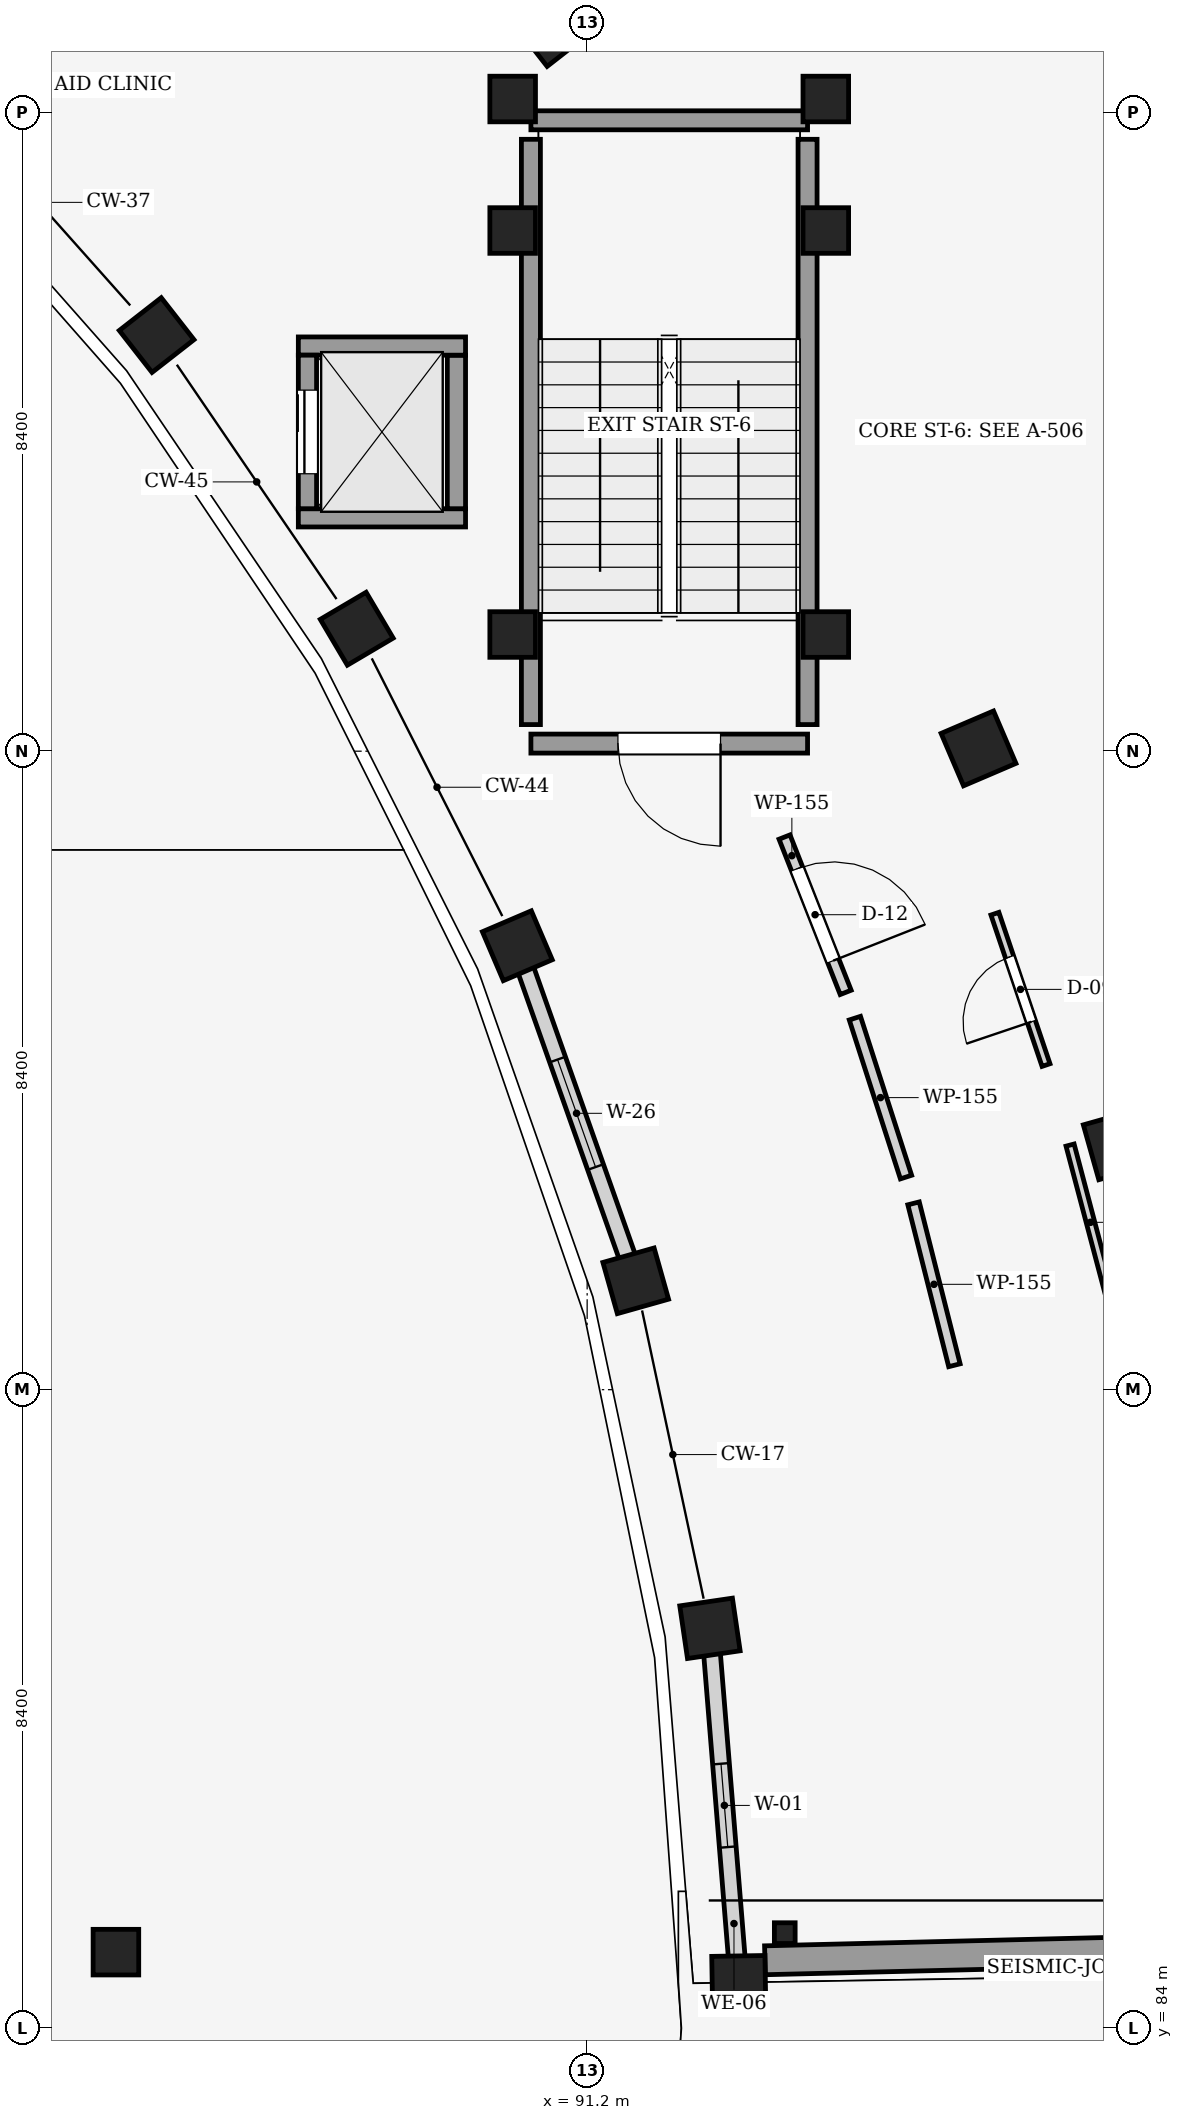
"""IFC4 building model, lengths in metres.
Left out: names, types, materials, properties, quantities, classifications, styles, units other than length and angle.
Written with IfcOpenShell. Run it as: python <this file> out.ifc"""

import sys

from ifc_helpers import new_model, si_unit, direction, frame, frame_2d, origin, origin_2d, place, context, subcontext, project, spatial, rectangle, circle, hollow_circle, extrude, element, fill, save


model = new_model("IFC4")
c1 = context("Model", 3, precision=1e-05, world=origin(), true_north=direction((0.0, 1.0)))
c2 = subcontext(c1, "Body", "Model", "MODEL_VIEW")
j1 = project(units=[si_unit("LENGTHUNIT", "METRE"), si_unit("PLANEANGLEUNIT", "RADIAN")], contexts=[c1])
p1 = place(None, origin())
s1 = spatial("IfcSite", under=j1, at=p1, CompositionType="ELEMENT")
p2 = place(p1, origin())
s2 = spatial("IfcBuilding", under=s1, at=p2, CompositionType="ELEMENT")
p3 = place(p2, frame((0.0, 0.0, 5.1)))
s3 = spatial("IfcBuildingStorey", under=s2, at=p3, CompositionType="ELEMENT", Elevation=5.1)
for number, where, z_axis, x_axis in (
    (1, (93.195, 84.6, 0.0), (0.0, 0.0, 1.0), (1.0, 0.017, 0.0)),
    (2, (92.816, 89.26, 0.0), (0.0, 0.0, 1.0), (0.989, 0.145, 0.0)),
    (3, (91.839, 93.832, 0.0), (0.0, 0.0, 1.0), (0.962, 0.272, 0.0)),
):
    element("IfcColumn", number, at=place(p3, frame(where, z_axis=z_axis, x_axis=x_axis)), inside=s3, PredefinedType="COLUMN", context=c2, shape_type="SweptSolid", body=[
        extrude(rectangle(XDim=0.7, YDim=0.7, at=origin_2d()), origin(), (0.0, 0.0, 1.0), 4.05),
    ])
p4 = place(p3, frame((98.191, 95.625, 0.0), z_axis=(0.0, 0.0, 1.0), x_axis=(0.962407846499, 0.271608425858, 0.0)))
e4 = element("IfcColumn", 4, at=p4, inside=s3, PredefinedType="COLUMN", context=c2, shape_type="SweptSolid", body=[
    extrude(circle(Radius=0.375, at=origin_2d()), origin(), (0.0, 0.0, 1.0), 4.05),
])
p5 = place(p3, frame((90.281, 98.24, 0.0), z_axis=(0.0, 0.0, 1.0), x_axis=(0.919410138581, 0.393300136124, 0.0)))
e5 = element("IfcColumn", 5, at=p5, inside=s3, PredefinedType="COLUMN", context=c2, shape_type="SweptSolid", body=[
    extrude(rectangle(XDim=0.7, YDim=0.7, at=origin_2d()), origin(), (0.0, 0.0, 1.0), 4.05),
])
p6 = place(p3, frame((96.349, 100.837, 0.0), z_axis=(0.0, 0.0, 1.0), x_axis=(0.919410138581, 0.393300136124, 0.0)))
e6 = element("IfcColumn", 6, at=p6, inside=s3, PredefinedType="COLUMN", context=c2, shape_type="SweptSolid", body=[
    extrude(circle(Radius=0.375, at=origin_2d()), origin(), (0.0, 0.0, 1.0), 4.05),
])
for number, where, z_axis, x_axis in (
    (7, (88.168, 102.411, 0.0), (0.0, 0.0, 1.0), (0.861, 0.509, 0.0)),
    (8, (85.536, 106.274, 0.0), (0.0, 0.0, 1.0), (0.788, 0.615, 0.0)),
):
    element("IfcColumn", number, at=place(p3, frame(where, z_axis=z_axis, x_axis=x_axis)), inside=s3, PredefinedType="COLUMN", context=c2, shape_type="SweptSolid", body=[
        extrude(rectangle(XDim=0.7, YDim=0.7, at=origin_2d()), origin(), (0.0, 0.0, 1.0), 4.05),
    ])
p7 = place(p3, frame((90.738, 110.336, 0.0), z_axis=(0.0, 0.0, 1.0), x_axis=(0.78822561199, 0.615386370179, 0.0)))
e9 = element("IfcColumn", 9, at=p7, inside=s3, PredefinedType="COLUMN", context=c2, shape_type="SweptSolid", body=[
    extrude(circle(Radius=0.375, at=origin_2d()), origin(), (0.0, 0.0, 1.0), 4.05),
])
p8 = place(p3, frame((93.8, 85.25, 0.0), z_axis=(0.0, 0.0, 1.0), x_axis=(1.0, 0.0, 0.0)))
e10 = element("IfcColumn", 10, at=p8, inside=s3, PredefinedType="COLUMN", context=c2, shape_type="SweptSolid", body=[
    extrude(hollow_circle(Radius=0.136, WallThickness=0.016, at=origin_2d()), origin(), (0.0, 0.0, 1.0), 3.82),
])
for number, where, z_axis, x_axis in (
    (11, (94.34, 102.335, 0.0), (0.0, 0.0, 1.0), (1.0, 0.0, 0.0)),
    (12, (90.22, 102.335, 0.0), (0.0, 0.0, 1.0), (1.0, 0.0, 0.0)),
    (13, (94.34, 107.65, 0.0), (0.0, 0.0, 1.0), (1.0, 0.0, 0.0)),
    (14, (90.22, 107.65, 0.0), (0.0, 0.0, 1.0), (1.0, 0.0, 0.0)),
    (15, (94.34, 109.38, 0.0), (0.0, 0.0, 1.0), (1.0, 0.0, 0.0)),
    (16, (90.22, 109.38, 0.0), (0.0, 0.0, 1.0), (1.0, 0.0, 0.0)),
    (17, (85.0, 85.0, 0.0), (0.0, 0.0, 1.0), (1.0, 0.0, 0.0)),
):
    element("IfcColumn", number, at=place(p3, frame(where, z_axis=z_axis, x_axis=x_axis)), inside=s3, PredefinedType="COLUMN", context=c2, shape_type="SweptSolid", body=[
        extrude(rectangle(XDim=0.6, YDim=0.6, at=origin_2d()), origin(), (0.0, 0.0, 1.0), 4.05),
    ])
p9 = place(p3, frame((93.172, 84.885, 0.0), z_axis=(0.0, 0.0, 1.0), x_axis=(-0.081095435938, 0.99670634104, 0.0)))
e18 = element("IfcWall", 18, at=p9, inside=s3, PredefinedType="STANDARD", context=c2, shape_type="SweptSolid", body=[
    extrude(rectangle(XDim=4.103, YDim=0.22, at=frame_2d((2.052, 0.0))), origin(), (0.0, 0.0, 1.0), 3.145),
])
p10 = place(p9, frame((1.502, 0.0, 0.85)))
e19 = element("IfcOpeningElement", 19, at=p10, cuts=e18, PredefinedType="OPENING", context=c2, shape_type="SweptSolid", body=[
    extrude(rectangle(XDim=1.1, YDim=1.35, at=frame_2d((0.55, 0.675))), frame((0.0, 0.12, 0.0), z_axis=(0.0, -1.0, 0.0), x_axis=(1.0, 0.0, 0.0)), (0.0, 0.0, 1.0), 0.24),
])
p11 = place(p3, frame((91.739, 94.117, 0.0), z_axis=(0.0, 0.0, 1.0), x_axis=(-0.333215363075, 0.942850742064, 0.0)))
e20 = element("IfcWall", 20, at=p11, inside=s3, PredefinedType="STANDARD", context=c2, shape_type="SweptSolid", body=[
    extrude(rectangle(XDim=4.071, YDim=0.22, at=frame_2d((2.035, 0.0))), origin(), (0.0, 0.0, 1.0), 3.145),
])
p12 = place(p11, frame((1.285, 0.0, 0.85)))
e21 = element("IfcOpeningElement", 21, at=p12, cuts=e20, PredefinedType="OPENING", context=c2, shape_type="SweptSolid", body=[
    extrude(rectangle(XDim=1.5, YDim=1.85, at=frame_2d((0.75, 0.925))), frame((0.0, 0.12, 0.0), z_axis=(0.0, -1.0, 0.0), x_axis=(1.0, 0.0, 0.0)), (0.0, 0.0, 1.0), 0.24),
])
p13 = place(p3, frame((95.82, 113.865, 0.0), z_axis=(0.0, 0.0, 1.0), x_axis=(0.563124533307, -0.826372046955, 0.0)))
e22 = element("IfcWall", 22, at=p13, inside=s3, PredefinedType="STANDARD", context=c2, shape_type="SweptSolid", body=[
    extrude(rectangle(XDim=5.639, YDim=0.27, at=frame_2d((2.819, 0.0))), origin(), (0.0, 0.0, 1.0), 3.145),
])
p14 = place(p13, frame((1.944, 0.0, 0.85)))
e23 = element("IfcOpeningElement", 23, at=p14, cuts=e22, PredefinedType="OPENING", context=c2, shape_type="SweptSolid", body=[
    extrude(rectangle(XDim=1.75, YDim=1.85, at=frame_2d((0.875, 0.925))), frame((0.0, 0.145, 0.0), z_axis=(0.0, -1.0, 0.0), x_axis=(1.0, 0.0, 0.0)), (0.0, 0.0, 1.0), 0.29),
])
p15 = place(p3, frame((103.85, 85.145, 0.0), z_axis=(0.0, 0.0, 1.0), x_axis=(-0.999701591947, -0.024427997417, 0.0)))
e24 = element("IfcWall", 24, at=p15, inside=s3, PredefinedType="SHEAR", context=c2, shape_type="SweptSolid", body=[
    extrude(rectangle(XDim=10.314, YDim=0.38, at=frame_2d((5.157, 0.0))), origin(), (0.0, 0.0, 1.0), 3.75),
])
p16 = place(p3, frame((94.1, 100.9, 0.0), z_axis=(0.0, 0.0, 1.0), x_axis=(-1.0, 0.0, 0.0)))
e25 = element("IfcWall", 25, at=p16, inside=s3, PredefinedType="SHEAR", context=c2, shape_type="SweptSolid", body=[
    extrude(rectangle(XDim=3.64, YDim=0.25, at=frame_2d((1.82, 0.0))), origin(), (0.0, 0.0, 1.0), 4.05),
])
p17 = place(p16, frame((1.145, 0.0, 0.0)))
e26 = element("IfcOpeningElement", 26, at=p17, cuts=e25, PredefinedType="OPENING", context=c2, shape_type="SweptSolid", body=[
    extrude(rectangle(XDim=1.35, YDim=2.2, at=frame_2d((0.675, 1.1))), frame((0.0, 0.135, 0.0), z_axis=(0.0, -1.0, 0.0), x_axis=(1.0, 0.0, 0.0)), (0.0, 0.0, 1.0), 0.27),
])
p18 = place(p3, frame((90.46, 101.15, 0.0), z_axis=(0.0, 0.0, 1.0), x_axis=(0.0, 1.0, 0.0)))
e27 = element("IfcWall", 27, at=p18, inside=s3, PredefinedType="SHEAR", context=c2, shape_type="SweptSolid", body=[
    extrude(rectangle(XDim=7.7, YDim=0.25, at=frame_2d((3.85, 0.0))), origin(), (0.0, 0.0, 1.0), 4.05),
])
p19 = place(p3, frame((90.46, 109.1, 0.0), z_axis=(0.0, 0.0, 1.0), x_axis=(1.0, 0.0, 0.0)))
e28 = element("IfcWall", 28, at=p19, inside=s3, PredefinedType="SHEAR", context=c2, shape_type="SweptSolid", body=[
    extrude(rectangle(XDim=3.64, YDim=0.25, at=frame_2d((1.82, 0.0))), origin(), (0.0, 0.0, 1.0), 4.05),
])
p20 = place(p3, frame((94.1, 108.85, 0.0), z_axis=(0.0, 0.0, 1.0), x_axis=(0.0, -1.0, 0.0)))
e29 = element("IfcWall", 29, at=p20, inside=s3, PredefinedType="SHEAR", context=c2, shape_type="SweptSolid", body=[
    extrude(rectangle(XDim=7.7, YDim=0.25, at=frame_2d((3.85, 0.0))), origin(), (0.0, 0.0, 1.0), 4.05),
])
p21 = place(p3, frame((89.6, 103.87, 0.0), z_axis=(0.0, 0.0, 1.0), x_axis=(-1.0, 0.0, 0.0)))
e30 = element("IfcWall", 30, at=p21, inside=s3, PredefinedType="SHEAR", context=c2, shape_type="SweptSolid", body=[
    extrude(rectangle(XDim=2.2, YDim=0.24, at=frame_2d((1.1, 0.0))), origin(), (0.0, 0.0, 1.0), 4.05),
])
p22 = place(p3, frame((89.48, 106.01, 0.0), z_axis=(0.0, 0.0, 1.0), x_axis=(0.0, -1.0, 0.0)))
e31 = element("IfcWall", 31, at=p22, inside=s3, PredefinedType="SHEAR", context=c2, shape_type="SweptSolid", body=[
    extrude(rectangle(XDim=2.02, YDim=0.24, at=frame_2d((1.01, 0.0))), origin(), (0.0, 0.0, 1.0), 4.05),
])
p23 = place(p3, frame((87.4, 106.13, 0.0), z_axis=(0.0, 0.0, 1.0), x_axis=(1.0, 0.0, 0.0)))
e32 = element("IfcWall", 32, at=p23, inside=s3, PredefinedType="SHEAR", context=c2, shape_type="SweptSolid", body=[
    extrude(rectangle(XDim=2.2, YDim=0.24, at=frame_2d((1.1, 0.0))), origin(), (0.0, 0.0, 1.0), 4.05),
])
p24 = place(p3, frame((87.52, 103.99, 0.0), z_axis=(0.0, 0.0, 1.0), x_axis=(0.0, 1.0, 0.0)))
e33 = element("IfcWall", 33, at=p24, inside=s3, PredefinedType="SHEAR", context=c2, shape_type="SweptSolid", body=[
    extrude(rectangle(XDim=2.02, YDim=0.24, at=frame_2d((1.01, 0.0))), origin(), (0.0, 0.0, 1.0), 4.05),
])
p25 = place(p24, frame((0.46, 0.0, 0.0)))
e34 = element("IfcOpeningElement", 34, at=p25, cuts=e33, PredefinedType="OPENING", context=c2, shape_type="SweptSolid", body=[
    extrude(rectangle(XDim=1.1, YDim=2.15, at=frame_2d((0.55, 1.075))), frame((0.0, 0.13, 0.0), z_axis=(0.0, -1.0, 0.0), x_axis=(1.0, 0.0, 0.0)), (0.0, 0.0, 1.0), 0.26),
])
p26 = place(p3, frame((98.091, 93.586, 0.0), z_axis=(0.0, 0.0, 1.0), x_axis=(-0.255630783162, 0.96677448389, 0.0)))
e35 = element("IfcWall", 35, at=p26, inside=s3, PredefinedType="PARTITIONING", context=c2, shape_type="SweptSolid", body=[
    extrude(rectangle(XDim=2.102, YDim=0.11, at=frame_2d((1.051, 0.0))), origin(), (0.0, 0.0, 1.0), 2.995),
])
p27 = place(p3, frame((97.237, 96.671, 0.0), z_axis=(0.0, 0.0, 1.0), x_axis=(-0.319884220621, 0.947456640379, 0.0)))
e36 = element("IfcWall", 36, at=p27, inside=s3, PredefinedType="PARTITIONING", context=c2, shape_type="SweptSolid", body=[
    extrude(rectangle(XDim=2.102, YDim=0.11, at=frame_2d((1.051, 0.0))), origin(), (0.0, 0.0, 1.0), 3.68),
])
p28 = place(p27, frame((0.601, 0.0, 0.0)))
e37 = element("IfcOpeningElement", 37, at=p28, cuts=e36, PredefinedType="OPENING", context=c2, shape_type="SweptSolid", body=[
    extrude(rectangle(XDim=0.9, YDim=2.22, at=frame_2d((0.45, 1.11))), frame((0.0, 0.065, 0.0), z_axis=(0.0, -1.0, 0.0), x_axis=(1.0, 0.0, 0.0)), (0.0, 0.0, 1.0), 0.13),
])
p29 = place(p3, frame((93.797, 99.67, 0.0), z_axis=(0.0, 0.0, 1.0), x_axis=(0.366364143448, -0.930471554856, 0.0)))
e38 = element("IfcWall", 38, at=p29, inside=s3, PredefinedType="PARTITIONING", context=c2, shape_type="SweptSolid", body=[
    extrude(rectangle(XDim=2.197, YDim=0.155, at=frame_2d((1.098, 0.0))), origin(), (0.0, 0.0, 1.0), 3.68),
])
p30 = place(p29, frame((0.448, 0.0, 0.0)))
e39 = element("IfcOpeningElement", 39, at=p30, cuts=e38, PredefinedType="OPENING", context=c2, shape_type="SweptSolid", body=[
    extrude(rectangle(XDim=1.3, YDim=2.22, at=frame_2d((0.65, 1.11))), frame((0.0, 0.087, 0.0), z_axis=(0.0, -1.0, 0.0), x_axis=(1.0, 0.0, 0.0)), (0.0, 0.0, 1.0), 0.175),
])
for number, where, z_axis, x_axis in (
    (40, (94.723, 97.288, 0.0), (0.0, 0.0, 1.0), (0.306, -0.952, 0.0)),
    (41, (95.495, 94.851, 0.0), (0.0, 0.0, 1.0), (0.245, -0.97, 0.0)),
):
    element("IfcWall", number, at=place(p3, frame(where, z_axis=z_axis, x_axis=x_axis)), inside=s3, PredefinedType="PARTITIONING", context=c2, shape_type="SweptSolid", body=[
        extrude(rectangle(XDim=2.197, YDim=0.155, at=frame_2d((1.098, 0.0))), origin(), (0.0, 0.0, 1.0), 2.995),
    ])
p31 = place(p10, origin())
e42 = element("IfcWindow", 42, at=p31, inside=s3, PartitioningType="SINGLE_PANEL", PredefinedType="WINDOW", context=c2, shape_type="SweptSolid", body=[
    extrude(rectangle(XDim=1.1, YDim=1.35, at=frame_2d((0.55, 0.675))), frame((0.0, 0.03, 0.0), z_axis=(0.0, -1.0, 0.0), x_axis=(1.0, 0.0, 0.0)), (0.0, 0.0, 1.0), 0.06),
])
fill(e19, e42)
p32 = place(p12, origin())
e43 = element("IfcWindow", 43, at=p32, inside=s3, PartitioningType="SINGLE_PANEL", PredefinedType="WINDOW", context=c2, shape_type="SweptSolid", body=[
    extrude(rectangle(XDim=1.5, YDim=1.85, at=frame_2d((0.75, 0.925))), frame((0.0, 0.03, 0.0), z_axis=(0.0, -1.0, 0.0), x_axis=(1.0, 0.0, 0.0)), (0.0, 0.0, 1.0), 0.06),
])
fill(e21, e43)
p33 = place(p17, origin())
e44 = element("IfcDoor", 44, at=p33, inside=s3, OperationType="SINGLE_SWING_LEFT", PredefinedType="DOOR", context=c2, shape_type="SweptSolid", body=[
    extrude(rectangle(XDim=1.35, YDim=2.2, at=frame_2d((0.675, 1.1))), frame((0.0, 0.025, 0.0), z_axis=(0.0, -1.0, 0.0), x_axis=(1.0, 0.0, 0.0)), (0.0, 0.0, 1.0), 0.05),
])
fill(e26, e44)
p34 = place(p25, origin())
e45 = element("IfcDoor", 45, at=p34, inside=s3, OperationType="SLIDING_TO_RIGHT", PredefinedType="DOOR", context=c2, shape_type="SweptSolid", body=[
    extrude(rectangle(XDim=1.1, YDim=2.15, at=frame_2d((0.55, 1.075))), frame((0.0, 0.025, 0.0), z_axis=(0.0, -1.0, 0.0), x_axis=(1.0, 0.0, 0.0)), (0.0, 0.0, 1.0), 0.05),
])
fill(e34, e45)
p35 = place(p28, origin())
e46 = element("IfcDoor", 46, at=p35, inside=s3, OperationType="SINGLE_SWING_LEFT", PredefinedType="DOOR", context=c2, shape_type="SweptSolid", body=[
    extrude(rectangle(XDim=0.9, YDim=2.22, at=frame_2d((0.45, 1.11))), frame((0.0, 0.025, 0.0), z_axis=(0.0, -1.0, 0.0), x_axis=(1.0, 0.0, 0.0)), (0.0, 0.0, 1.0), 0.05),
])
fill(e37, e46)
p36 = place(p30, origin())
e47 = element("IfcDoor", 47, at=p36, inside=s3, OperationType="SINGLE_SWING_RIGHT", PredefinedType="DOOR", context=c2, shape_type="SweptSolid", body=[
    extrude(rectangle(XDim=1.3, YDim=2.22, at=frame_2d((0.65, 1.11))), frame((0.0, 0.025, 0.0), z_axis=(0.0, -1.0, 0.0), x_axis=(1.0, 0.0, 0.0)), (0.0, 0.0, 1.0), 0.05),
])
fill(e39, e47)
save(model, sys.argv[1])
